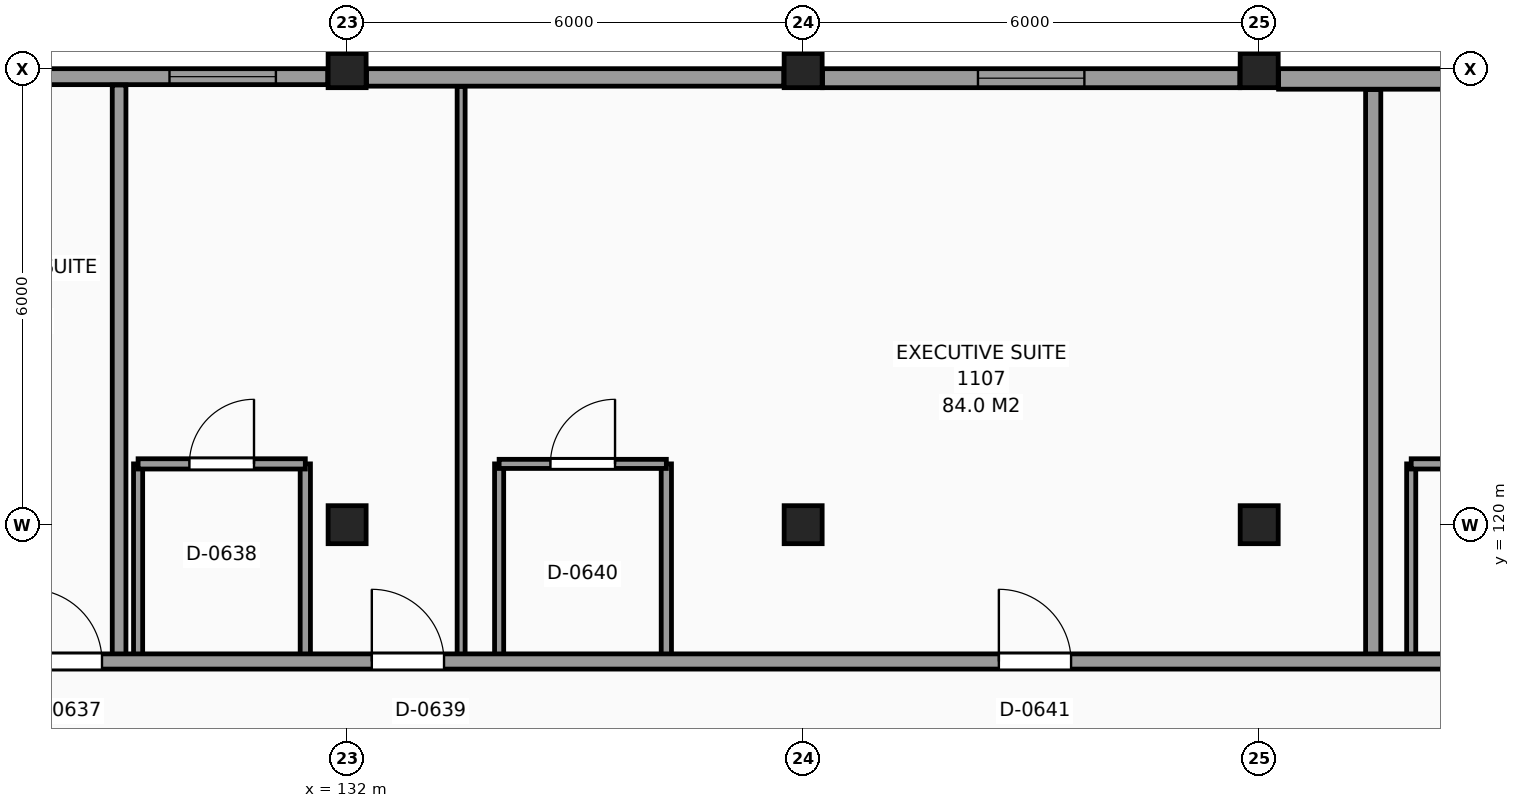
"""IFC4 building model, lengths in metres.
Left out: names, types, materials, properties, quantities, classifications, styles, units other than length and angle.
Written with IfcOpenShell. Run it as: python <this file> out.ifc"""

import sys

from ifc_helpers import new_model, si_unit, direction, frame, frame_2d, origin, origin_2d, place, context, subcontext, project, spatial, rectangle, extrude, element, fill, save


model = new_model("IFC4")
c1 = context("Model", 3, precision=1e-05, world=origin(), true_north=direction((0.0, 1.0)))
c2 = subcontext(c1, "Body", "Model", "MODEL_VIEW")
j1 = project(units=[si_unit("LENGTHUNIT", "METRE"), si_unit("PLANEANGLEUNIT", "RADIAN")], contexts=[c1])
p1 = place(None, origin())
s1 = spatial("IfcSite", under=j1, at=p1, CompositionType="ELEMENT")
p2 = place(p1, origin())
s2 = spatial("IfcBuilding", under=s1, at=p2, CompositionType="ELEMENT")
p3 = place(p2, frame((0.0, 0.0, 44.7)))
s3 = spatial("IfcBuildingStorey", under=s2, at=p3, CompositionType="ELEMENT", Elevation=44.7)
for number, where, z_axis, x_axis in (
    (1, (132.0, 120.0, 0.0), (0.0, 0.0, 1.0), (1.0, 0.0, 0.0)),
    (2, (132.0, 126.0, 0.0), (0.0, 0.0, 1.0), (1.0, 0.0, 0.0)),
    (3, (138.0, 120.0, 0.0), (0.0, 0.0, 1.0), (1.0, 0.0, 0.0)),
    (4, (138.0, 126.0, 0.0), (0.0, 0.0, 1.0), (1.0, 0.0, 0.0)),
    (5, (144.0, 120.0, 0.0), (0.0, 0.0, 1.0), (1.0, 0.0, 0.0)),
    (6, (144.0, 126.0, 0.0), (0.0, 0.0, 1.0), (1.0, 0.0, 0.0)),
):
    element("IfcColumn", number, at=place(p3, frame(where, z_axis=z_axis, x_axis=x_axis)), inside=s3, PredefinedType="COLUMN", context=c2, shape_type="SweptSolid", body=[
        extrude(rectangle(XDim=0.5, YDim=0.5, at=origin_2d()), origin(), (0.0, 0.0, 1.0), 3.3),
    ])
p4 = place(p3, frame((149.745, 125.865, 0.0), z_axis=(0.0, 0.0, 1.0), x_axis=(-1.0, 0.0, 0.0)))
e7 = element("IfcWall", 7, at=p4, inside=s3, PredefinedType="SOLIDWALL", context=c2, shape_type="SweptSolid", body=[
    extrude(rectangle(XDim=5.49, YDim=0.27, at=frame_2d((2.745, 0.0))), origin(), (0.0, 0.0, 1.0), 2.4),
])
p5 = place(p4, frame((1.432, 0.0, 0.8)))
e8 = element("IfcOpeningElement", 8, at=p5, cuts=e7, PredefinedType="OPENING", context=c2, shape_type="SweptSolid", body=[
    extrude(rectangle(XDim=1.4, YDim=1.4, at=frame_2d((0.7, 0.7))), frame((0.0, 0.145, 0.0), z_axis=(0.0, -1.0, 0.0), x_axis=(1.0, 0.0, 0.0)), (0.0, 0.0, 1.0), 0.29),
])
p6 = place(p3, frame((143.745, 125.875, 0.0), z_axis=(0.0, 0.0, 1.0), x_axis=(-1.0, 0.0, 0.0)))
e9 = element("IfcWall", 9, at=p6, inside=s3, PredefinedType="SOLIDWALL", context=c2, shape_type="SweptSolid", body=[
    extrude(rectangle(XDim=5.49, YDim=0.25, at=frame_2d((2.745, 0.0))), origin(), (0.0, 0.0, 1.0), 2.4),
])
p7 = place(p6, frame((2.045, 0.0, 0.8)))
e10 = element("IfcOpeningElement", 10, at=p7, cuts=e9, PredefinedType="OPENING", context=c2, shape_type="SweptSolid", body=[
    extrude(rectangle(XDim=1.4, YDim=1.4, at=frame_2d((0.7, 0.7))), frame((0.0, 0.135, 0.0), z_axis=(0.0, -1.0, 0.0), x_axis=(1.0, 0.0, 0.0)), (0.0, 0.0, 1.0), 0.27),
])
p8 = place(p3, frame((137.745, 125.885, 0.0), z_axis=(0.0, 0.0, 1.0), x_axis=(-1.0, 0.0, 0.0)))
e11 = element("IfcWall", 11, at=p8, inside=s3, PredefinedType="SOLIDWALL", context=c2, shape_type="SweptSolid", body=[
    extrude(rectangle(XDim=5.49, YDim=0.23, at=frame_2d((2.745, 0.0))), origin(), (0.0, 0.0, 1.0), 2.4),
])
p9 = place(p3, frame((131.745, 125.895, 0.0), z_axis=(0.0, 0.0, 1.0), x_axis=(-1.0, 0.0, 0.0)))
e12 = element("IfcWall", 12, at=p9, inside=s3, PredefinedType="SOLIDWALL", context=c2, shape_type="SweptSolid", body=[
    extrude(rectangle(XDim=5.49, YDim=0.21, at=frame_2d((2.745, 0.0))), origin(), (0.0, 0.0, 1.0), 2.4),
])
p10 = place(p9, frame((0.682, 0.0, 0.8)))
e13 = element("IfcOpeningElement", 13, at=p10, cuts=e12, PredefinedType="OPENING", context=c2, shape_type="SweptSolid", body=[
    extrude(rectangle(XDim=1.4, YDim=1.4, at=frame_2d((0.7, 0.7))), frame((0.0, 0.115, 0.0), z_axis=(0.0, -1.0, 0.0), x_axis=(1.0, 0.0, 0.0)), (0.0, 0.0, 1.0), 0.23),
])
p11 = place(p3, frame((129.0, 118.2, 0.0), z_axis=(0.0, 0.0, 1.0), x_axis=(0.0, 1.0, 0.0)))
e14 = element("IfcWall", 14, at=p11, inside=s3, PredefinedType="PARTITIONING", context=c2, shape_type="SweptSolid", body=[
    extrude(rectangle(XDim=7.585, YDim=0.18, at=frame_2d((3.792, 0.0))), origin(), (0.0, 0.0, 1.0), 3.05),
])
p12 = place(p3, frame((129.25, 118.2, 0.0), z_axis=(0.0, 0.0, 1.0), x_axis=(0.0, 1.0, 0.0)))
e15 = element("IfcWall", 15, at=p12, inside=s3, PredefinedType="PARTITIONING", context=c2, shape_type="SweptSolid", body=[
    extrude(rectangle(XDim=2.6, YDim=0.12, at=frame_2d((1.3, 0.0))), origin(), (0.0, 0.0, 1.0), 3.05),
])
p13 = place(p3, frame((131.45, 118.2, 0.0), z_axis=(0.0, 0.0, 1.0), x_axis=(0.0, 1.0, 0.0)))
e16 = element("IfcWall", 16, at=p13, inside=s3, PredefinedType="PARTITIONING", context=c2, shape_type="SweptSolid", body=[
    extrude(rectangle(XDim=2.6, YDim=0.135, at=frame_2d((1.3, 0.0))), origin(), (0.0, 0.0, 1.0), 3.05),
])
p14 = place(p3, frame((133.5, 118.2, 0.0), z_axis=(0.0, 0.0, 1.0), x_axis=(0.0, 1.0, 0.0)))
e17 = element("IfcWall", 17, at=p14, inside=s3, PredefinedType="PARTITIONING", context=c2, shape_type="SweptSolid", body=[
    extrude(rectangle(XDim=7.565, YDim=0.105, at=frame_2d((3.782, 0.0))), origin(), (0.0, 0.0, 1.0), 3.05),
])
p15 = place(p3, frame((134.0, 118.2, 0.0), z_axis=(0.0, 0.0, 1.0), x_axis=(0.0, 1.0, 0.0)))
e18 = element("IfcWall", 18, at=p15, inside=s3, PredefinedType="PARTITIONING", context=c2, shape_type="SweptSolid", body=[
    extrude(rectangle(XDim=2.6, YDim=0.12, at=frame_2d((1.3, 0.0))), origin(), (0.0, 0.0, 1.0), 3.05),
])
p16 = place(p3, frame((136.2, 118.2, 0.0), z_axis=(0.0, 0.0, 1.0), x_axis=(0.0, 1.0, 0.0)))
e19 = element("IfcWall", 19, at=p16, inside=s3, PredefinedType="PARTITIONING", context=c2, shape_type="SweptSolid", body=[
    extrude(rectangle(XDim=2.6, YDim=0.135, at=frame_2d((1.3, 0.0))), origin(), (0.0, 0.0, 1.0), 3.05),
])
p17 = place(p3, frame((145.5, 118.2, 0.0), z_axis=(0.0, 0.0, 1.0), x_axis=(0.0, 1.0, 0.0)))
e20 = element("IfcWall", 20, at=p17, inside=s3, PredefinedType="PARTITIONING", context=c2, shape_type="SweptSolid", body=[
    extrude(rectangle(XDim=7.525, YDim=0.2, at=frame_2d((3.763, 0.0))), origin(), (0.0, 0.0, 1.0), 3.05),
])
p18 = place(p3, frame((146.0, 118.2, 0.0), z_axis=(0.0, 0.0, 1.0), x_axis=(0.0, 1.0, 0.0)))
e21 = element("IfcWall", 21, at=p18, inside=s3, PredefinedType="PARTITIONING", context=c2, shape_type="SweptSolid", body=[
    extrude(rectangle(XDim=2.6, YDim=0.12, at=frame_2d((1.3, 0.0))), origin(), (0.0, 0.0, 1.0), 3.05),
])
p19 = place(p3, frame((102.255, 118.2, 0.0), z_axis=(0.0, 0.0, 1.0), x_axis=(1.0, 0.0, 0.0)))
e22 = element("IfcWall", 22, at=p19, inside=s3, PredefinedType="PARTITIONING", context=c2, shape_type="SweptSolid", body=[
    extrude(rectangle(XDim=74.245, YDim=0.2, at=frame_2d((37.123, 0.0))), origin(), (0.0, 0.0, 1.0), 3.05),
])
p20 = place(p19, frame((0.47, 0.0, 0.0)))
e23 = element("IfcOpeningElement", 23, at=p20, cuts=e22, PredefinedType="OPENING", context=c2, shape_type="SweptSolid", body=[
    extrude(rectangle(XDim=0.95, YDim=2.1, at=frame_2d((0.475, 1.05))), frame((0.0, 0.11, 0.0), z_axis=(0.0, -1.0, 0.0), x_axis=(1.0, 0.0, 0.0)), (0.0, 0.0, 1.0), 0.22),
])
p21 = place(p19, frame((4.87, 0.0, 0.0)))
e24 = element("IfcOpeningElement", 24, at=p21, cuts=e22, PredefinedType="OPENING", context=c2, shape_type="SweptSolid", body=[
    extrude(rectangle(XDim=0.95, YDim=2.1, at=frame_2d((0.475, 1.05))), frame((0.0, 0.11, 0.0), z_axis=(0.0, -1.0, 0.0), x_axis=(1.0, 0.0, 0.0)), (0.0, 0.0, 1.0), 0.22),
])
p22 = place(p19, frame((12.07, 0.0, 0.0)))
e25 = element("IfcOpeningElement", 25, at=p22, cuts=e22, PredefinedType="OPENING", context=c2, shape_type="SweptSolid", body=[
    extrude(rectangle(XDim=0.95, YDim=2.1, at=frame_2d((0.475, 1.05))), frame((0.0, 0.11, 0.0), z_axis=(0.0, -1.0, 0.0), x_axis=(1.0, 0.0, 0.0)), (0.0, 0.0, 1.0), 0.22),
])
p23 = place(p19, frame((16.27, 0.0, 0.0)))
e26 = element("IfcOpeningElement", 26, at=p23, cuts=e22, PredefinedType="OPENING", context=c2, shape_type="SweptSolid", body=[
    extrude(rectangle(XDim=0.95, YDim=2.1, at=frame_2d((0.475, 1.05))), frame((0.0, 0.11, 0.0), z_axis=(0.0, -1.0, 0.0), x_axis=(1.0, 0.0, 0.0)), (0.0, 0.0, 1.0), 0.22),
])
p24 = place(p19, frame((25.57, 0.0, 0.0)))
e27 = element("IfcOpeningElement", 27, at=p24, cuts=e22, PredefinedType="OPENING", context=c2, shape_type="SweptSolid", body=[
    extrude(rectangle(XDim=0.95, YDim=2.1, at=frame_2d((0.475, 1.05))), frame((0.0, 0.11, 0.0), z_axis=(0.0, -1.0, 0.0), x_axis=(1.0, 0.0, 0.0)), (0.0, 0.0, 1.0), 0.22),
])
p25 = place(p19, frame((30.07, 0.0, 0.0)))
e28 = element("IfcOpeningElement", 28, at=p25, cuts=e22, PredefinedType="OPENING", context=c2, shape_type="SweptSolid", body=[
    extrude(rectangle(XDim=0.95, YDim=2.1, at=frame_2d((0.475, 1.05))), frame((0.0, 0.11, 0.0), z_axis=(0.0, -1.0, 0.0), x_axis=(1.0, 0.0, 0.0)), (0.0, 0.0, 1.0), 0.22),
])
p26 = place(p19, frame((38.32, 0.0, 0.0)))
e29 = element("IfcOpeningElement", 29, at=p26, cuts=e22, PredefinedType="OPENING", context=c2, shape_type="SweptSolid", body=[
    extrude(rectangle(XDim=0.95, YDim=2.1, at=frame_2d((0.475, 1.05))), frame((0.0, 0.11, 0.0), z_axis=(0.0, -1.0, 0.0), x_axis=(1.0, 0.0, 0.0)), (0.0, 0.0, 1.0), 0.22),
])
p27 = place(p19, frame((46.27, 0.0, 0.0)))
e30 = element("IfcOpeningElement", 30, at=p27, cuts=e22, PredefinedType="OPENING", context=c2, shape_type="SweptSolid", body=[
    extrude(rectangle(XDim=0.95, YDim=2.1, at=frame_2d((0.475, 1.05))), frame((0.0, 0.11, 0.0), z_axis=(0.0, -1.0, 0.0), x_axis=(1.0, 0.0, 0.0)), (0.0, 0.0, 1.0), 0.22),
])
p28 = place(p19, frame((48.47, 0.0, 0.0)))
e31 = element("IfcOpeningElement", 31, at=p28, cuts=e22, PredefinedType="OPENING", context=c2, shape_type="SweptSolid", body=[
    extrude(rectangle(XDim=0.95, YDim=2.1, at=frame_2d((0.475, 1.05))), frame((0.0, 0.11, 0.0), z_axis=(0.0, -1.0, 0.0), x_axis=(1.0, 0.0, 0.0)), (0.0, 0.0, 1.0), 0.22),
])
p29 = place(p19, frame((54.47, 0.0, 0.0)))
e32 = element("IfcOpeningElement", 32, at=p29, cuts=e22, PredefinedType="OPENING", context=c2, shape_type="SweptSolid", body=[
    extrude(rectangle(XDim=0.95, YDim=2.1, at=frame_2d((0.475, 1.05))), frame((0.0, 0.11, 0.0), z_axis=(0.0, -1.0, 0.0), x_axis=(1.0, 0.0, 0.0)), (0.0, 0.0, 1.0), 0.22),
])
p30 = place(p19, frame((64.27, 0.0, 0.0)))
e33 = element("IfcOpeningElement", 33, at=p30, cuts=e22, PredefinedType="OPENING", context=c2, shape_type="SweptSolid", body=[
    extrude(rectangle(XDim=0.95, YDim=2.1, at=frame_2d((0.475, 1.05))), frame((0.0, 0.11, 0.0), z_axis=(0.0, -1.0, 0.0), x_axis=(1.0, 0.0, 0.0)), (0.0, 0.0, 1.0), 0.22),
])
p31 = place(p19, frame((68.22, 0.0, 0.0)))
e34 = element("IfcOpeningElement", 34, at=p31, cuts=e22, PredefinedType="OPENING", context=c2, shape_type="SweptSolid", body=[
    extrude(rectangle(XDim=0.95, YDim=2.1, at=frame_2d((0.475, 1.05))), frame((0.0, 0.11, 0.0), z_axis=(0.0, -1.0, 0.0), x_axis=(1.0, 0.0, 0.0)), (0.0, 0.0, 1.0), 0.22),
])
p32 = place(p3, frame((129.25, 120.8, 0.0), z_axis=(0.0, 0.0, 1.0), x_axis=(1.0, 0.0, 0.0)))
e35 = element("IfcWall", 35, at=p32, inside=s3, PredefinedType="PARTITIONING", context=c2, shape_type="SweptSolid", body=[
    extrude(rectangle(XDim=2.2, YDim=0.135, at=frame_2d((1.1, 0.0))), origin(), (0.0, 0.0, 1.0), 3.05),
])
p33 = place(p32, frame((0.675, 0.0, 0.0)))
e36 = element("IfcOpeningElement", 36, at=p33, cuts=e35, PredefinedType="OPENING", context=c2, shape_type="SweptSolid", body=[
    extrude(rectangle(XDim=0.85, YDim=2.1, at=frame_2d((0.425, 1.05))), frame((0.0, 0.078, 0.0), z_axis=(0.0, -1.0, 0.0), x_axis=(1.0, 0.0, 0.0)), (0.0, 0.0, 1.0), 0.155),
])
p34 = place(p3, frame((134.0, 120.8, 0.0), z_axis=(0.0, 0.0, 1.0), x_axis=(1.0, 0.0, 0.0)))
e37 = element("IfcWall", 37, at=p34, inside=s3, PredefinedType="PARTITIONING", context=c2, shape_type="SweptSolid", body=[
    extrude(rectangle(XDim=2.2, YDim=0.12, at=frame_2d((1.1, 0.0))), origin(), (0.0, 0.0, 1.0), 3.05),
])
p35 = place(p34, frame((0.675, 0.0, 0.0)))
e38 = element("IfcOpeningElement", 38, at=p35, cuts=e37, PredefinedType="OPENING", context=c2, shape_type="SweptSolid", body=[
    extrude(rectangle(XDim=0.85, YDim=2.1, at=frame_2d((0.425, 1.05))), frame((0.0, 0.07, 0.0), z_axis=(0.0, -1.0, 0.0), x_axis=(1.0, 0.0, 0.0)), (0.0, 0.0, 1.0), 0.14),
])
p36 = place(p3, frame((146.0, 120.8, 0.0), z_axis=(0.0, 0.0, 1.0), x_axis=(1.0, 0.0, 0.0)))
e39 = element("IfcWall", 39, at=p36, inside=s3, PredefinedType="PARTITIONING", context=c2, shape_type="SweptSolid", body=[
    extrude(rectangle(XDim=2.2, YDim=0.135, at=frame_2d((1.1, 0.0))), origin(), (0.0, 0.0, 1.0), 3.05),
])
p37 = place(p36, frame((0.675, 0.0, 0.0)))
e40 = element("IfcOpeningElement", 40, at=p37, cuts=e39, PredefinedType="OPENING", context=c2, shape_type="SweptSolid", body=[
    extrude(rectangle(XDim=0.85, YDim=2.1, at=frame_2d((0.425, 1.05))), frame((0.0, 0.078, 0.0), z_axis=(0.0, -1.0, 0.0), x_axis=(1.0, 0.0, 0.0)), (0.0, 0.0, 1.0), 0.155),
])
p38 = place(p10, origin())
e41 = element("IfcWindow", 41, at=p38, inside=s3, PartitioningType="SINGLE_PANEL", PredefinedType="WINDOW", context=c2, shape_type="SweptSolid", body=[
    extrude(rectangle(XDim=1.4, YDim=1.4, at=frame_2d((0.7, 0.7))), frame((0.0, 0.03, 0.0), z_axis=(0.0, -1.0, 0.0), x_axis=(1.0, 0.0, 0.0)), (0.0, 0.0, 1.0), 0.06),
])
fill(e13, e41)
p39 = place(p7, origin())
e42 = element("IfcWindow", 42, at=p39, inside=s3, PartitioningType="SINGLE_PANEL", PredefinedType="WINDOW", context=c2, shape_type="SweptSolid", body=[
    extrude(rectangle(XDim=1.4, YDim=1.4, at=frame_2d((0.7, 0.7))), frame((0.0, 0.03, 0.0), z_axis=(0.0, -1.0, 0.0), x_axis=(1.0, 0.0, 0.0)), (0.0, 0.0, 1.0), 0.06),
])
fill(e10, e42)
p40 = place(p24, origin())
e43 = element("IfcDoor", 43, at=p40, inside=s3, OperationType="SINGLE_SWING_LEFT", PredefinedType="DOOR", context=c2, shape_type="SweptSolid", body=[
    extrude(rectangle(XDim=0.95, YDim=2.1, at=frame_2d((0.475, 1.05))), frame((0.0, 0.025, 0.0), z_axis=(0.0, -1.0, 0.0), x_axis=(1.0, 0.0, 0.0)), (0.0, 0.0, 1.0), 0.05),
])
fill(e27, e43)
p41 = place(p33, origin())
e44 = element("IfcDoor", 44, at=p41, inside=s3, OperationType="SINGLE_SWING_RIGHT", PredefinedType="DOOR", context=c2, shape_type="SweptSolid", body=[
    extrude(rectangle(XDim=0.85, YDim=2.1, at=frame_2d((0.425, 1.05))), frame((0.0, 0.025, 0.0), z_axis=(0.0, -1.0, 0.0), x_axis=(1.0, 0.0, 0.0)), (0.0, 0.0, 1.0), 0.05),
])
fill(e36, e44)
p42 = place(p25, origin())
e45 = element("IfcDoor", 45, at=p42, inside=s3, OperationType="SINGLE_SWING_LEFT", PredefinedType="DOOR", context=c2, shape_type="SweptSolid", body=[
    extrude(rectangle(XDim=0.95, YDim=2.1, at=frame_2d((0.475, 1.05))), frame((0.0, 0.025, 0.0), z_axis=(0.0, -1.0, 0.0), x_axis=(1.0, 0.0, 0.0)), (0.0, 0.0, 1.0), 0.05),
])
fill(e28, e45)
p43 = place(p35, origin())
e46 = element("IfcDoor", 46, at=p43, inside=s3, OperationType="SINGLE_SWING_RIGHT", PredefinedType="DOOR", context=c2, shape_type="SweptSolid", body=[
    extrude(rectangle(XDim=0.85, YDim=2.1, at=frame_2d((0.425, 1.05))), frame((0.0, 0.025, 0.0), z_axis=(0.0, -1.0, 0.0), x_axis=(1.0, 0.0, 0.0)), (0.0, 0.0, 1.0), 0.05),
])
fill(e38, e46)
p44 = place(p26, origin())
e47 = element("IfcDoor", 47, at=p44, inside=s3, OperationType="SINGLE_SWING_LEFT", PredefinedType="DOOR", context=c2, shape_type="SweptSolid", body=[
    extrude(rectangle(XDim=0.95, YDim=2.1, at=frame_2d((0.475, 1.05))), frame((0.0, 0.025, 0.0), z_axis=(0.0, -1.0, 0.0), x_axis=(1.0, 0.0, 0.0)), (0.0, 0.0, 1.0), 0.05),
])
fill(e29, e47)
save(model, sys.argv[1])
